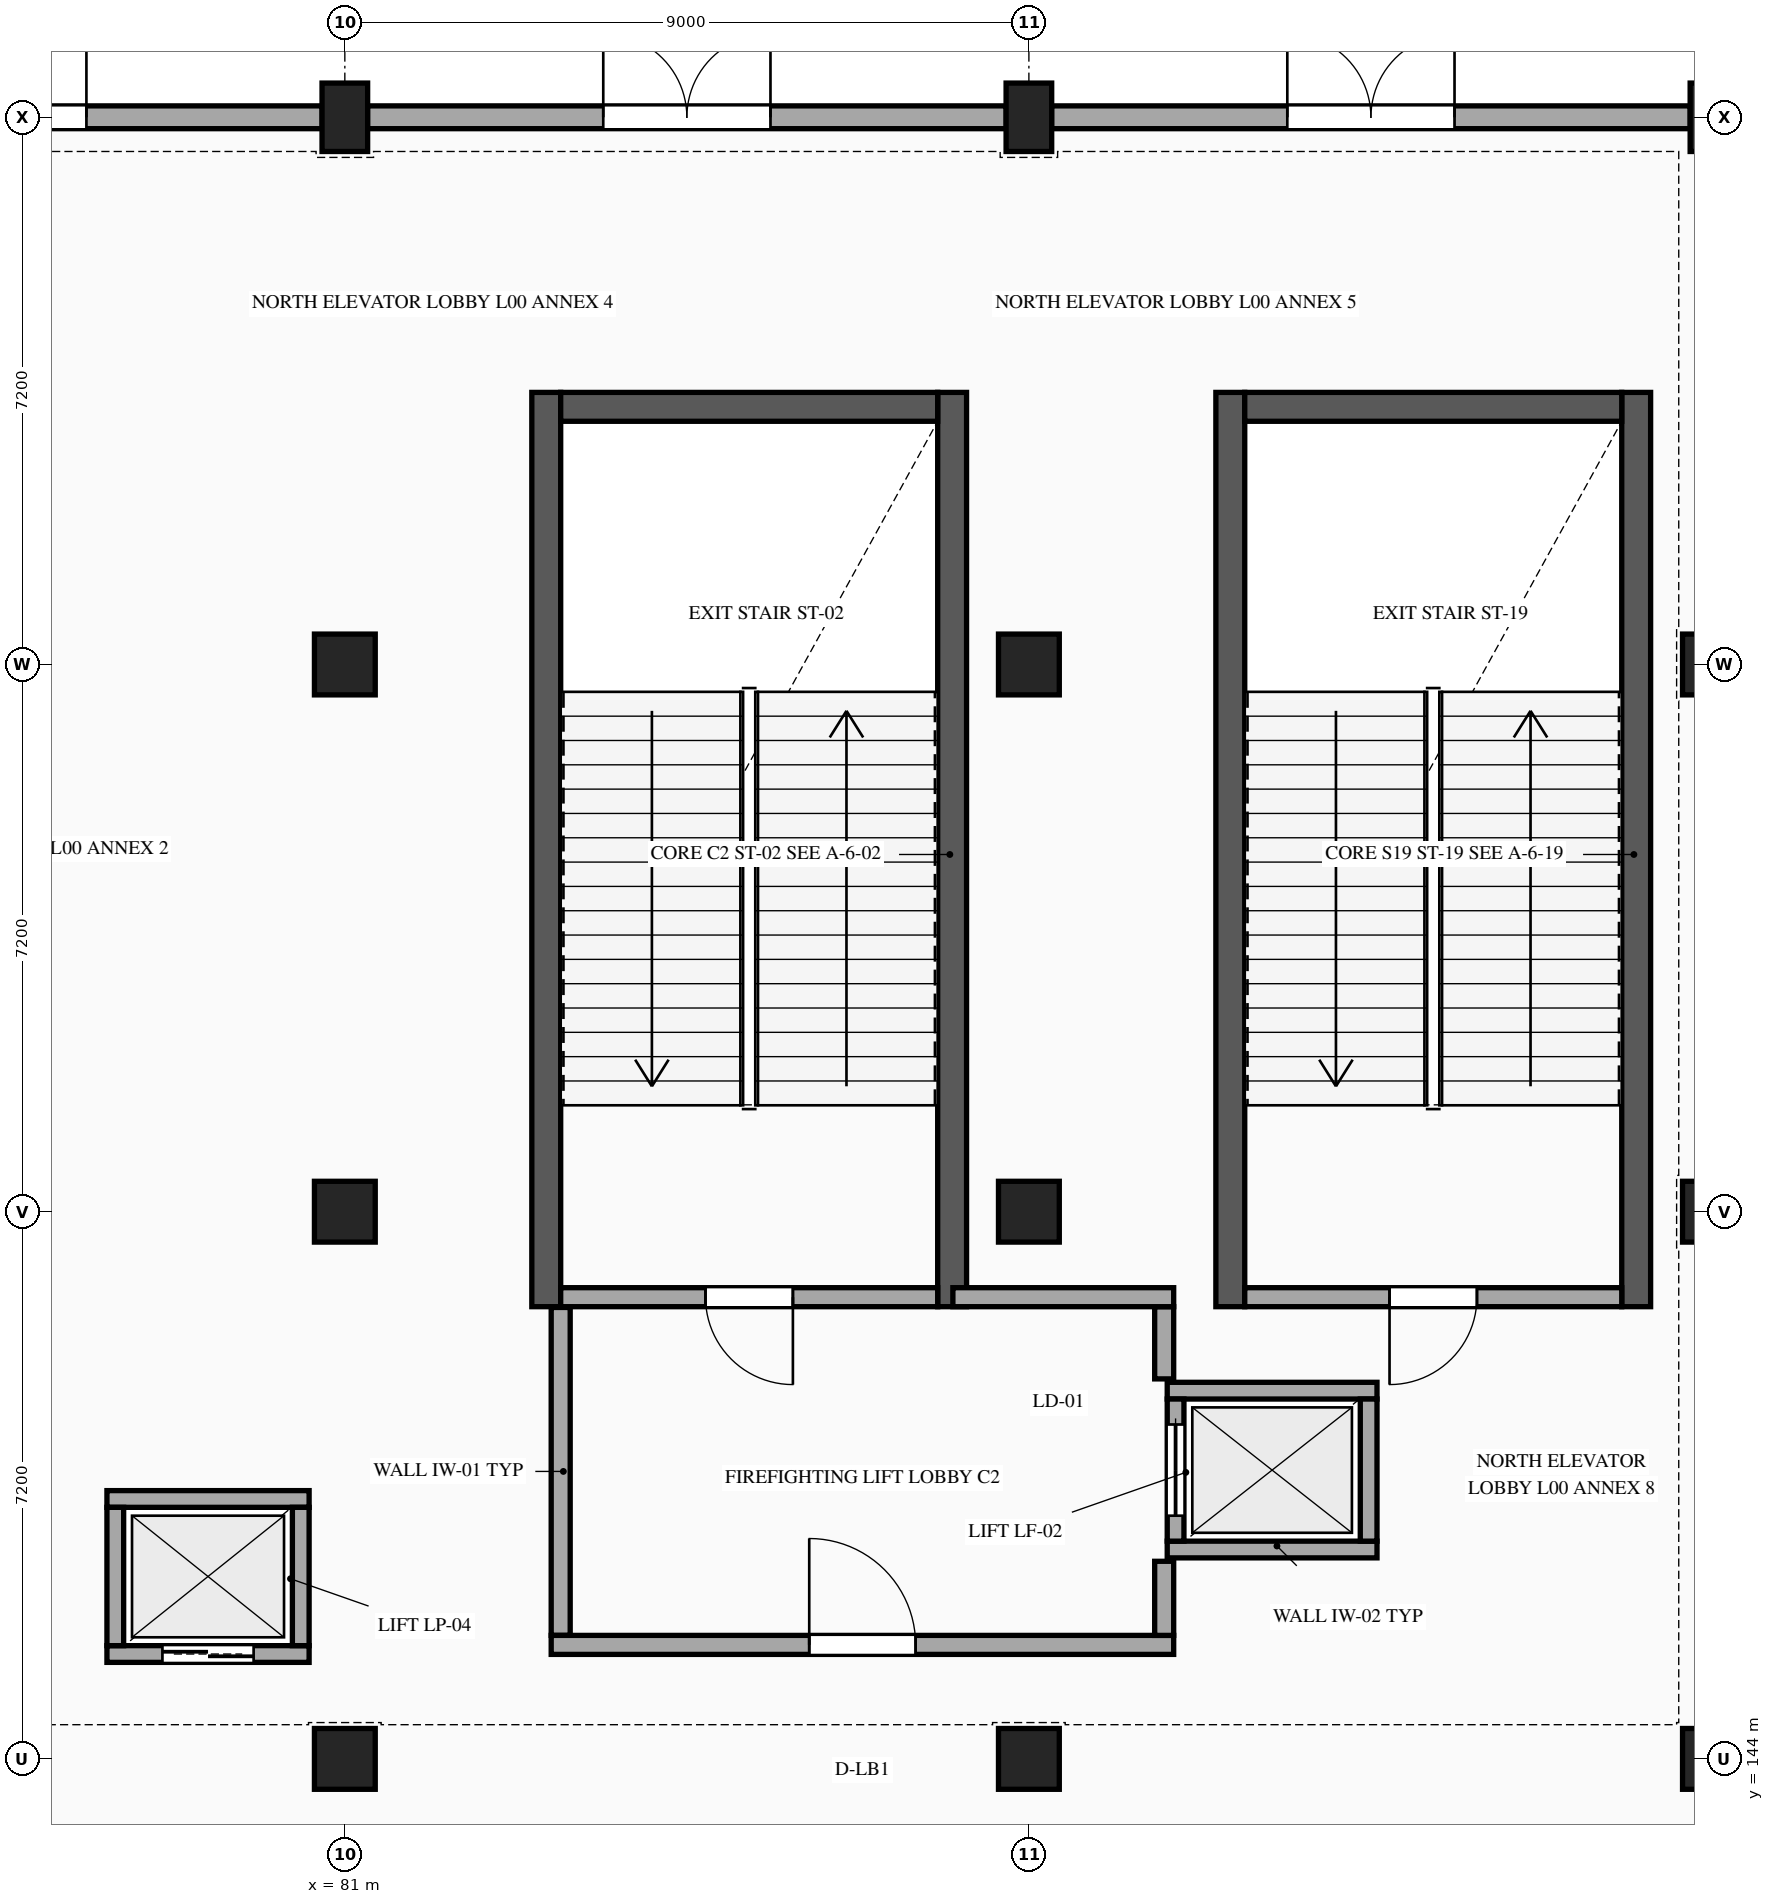
"""IFC4 building model, lengths in metres.
Left out: names, types, materials, properties, quantities, classifications, styles, units other than length and angle.
Written with IfcOpenShell. Run it as: python <this file> out.ifc"""

import sys

from ifc_helpers import new_model, si_unit, direction, frame, frame_2d, origin, origin_2d, place, context, subcontext, project, spatial, rectangle, extrude, element, fill, save


model = new_model("IFC4")
c1 = context("Model", 3, precision=1e-05, world=origin(), true_north=direction((0.0, 1.0)))
c2 = subcontext(c1, "Body", "Model", "MODEL_VIEW")
j1 = project(units=[si_unit("LENGTHUNIT", "METRE"), si_unit("PLANEANGLEUNIT", "RADIAN")], contexts=[c1])
p1 = place(None, origin())
s1 = spatial("IfcSite", under=j1, at=p1, CompositionType="ELEMENT")
p2 = place(p1, origin())
s2 = spatial("IfcBuilding", under=s1, at=p2, CompositionType="ELEMENT")
p3 = place(p2, origin())
s3 = spatial("IfcBuildingStorey", under=s2, at=p3, CompositionType="ELEMENT", Elevation=0.0)
for number, where, z_axis, x_axis in (
    (1, (81.0, 144.0, 0.0), (0.0, 0.0, 1.0), (1.0, 0.0, 0.0)),
    (2, (81.0, 151.2, 0.0), (0.0, 0.0, 1.0), (1.0, 0.0, 0.0)),
    (3, (81.0, 158.4, 0.0), (0.0, 0.0, 1.0), (1.0, 0.0, 0.0)),
):
    element("IfcColumn", number, at=place(p3, frame(where, z_axis=z_axis, x_axis=x_axis)), inside=s3, PredefinedType="COLUMN", context=c2, shape_type="SweptSolid", body=[
        extrude(rectangle(XDim=0.8, YDim=0.8, at=origin_2d()), origin(), (0.0, 0.0, 1.0), 5.4),
    ])
p4 = place(p3, frame((81.0, 165.6, 0.0), z_axis=(0.0, 0.0, 1.0), x_axis=(1.0, 0.0, 0.0)))
e4 = element("IfcColumn", 4, at=p4, inside=s3, PredefinedType="COLUMN", context=c2, shape_type="SweptSolid", body=[
    extrude(rectangle(XDim=0.6, YDim=0.9, at=origin_2d()), origin(), (0.0, 0.0, 1.0), 5.4),
])
for number, where, z_axis, x_axis in (
    (5, (90.0, 144.0, 0.0), (0.0, 0.0, 1.0), (1.0, 0.0, 0.0)),
    (6, (90.0, 151.2, 0.0), (0.0, 0.0, 1.0), (1.0, 0.0, 0.0)),
    (7, (90.0, 158.4, 0.0), (0.0, 0.0, 1.0), (1.0, 0.0, 0.0)),
):
    element("IfcColumn", number, at=place(p3, frame(where, z_axis=z_axis, x_axis=x_axis)), inside=s3, PredefinedType="COLUMN", context=c2, shape_type="SweptSolid", body=[
        extrude(rectangle(XDim=0.8, YDim=0.8, at=origin_2d()), origin(), (0.0, 0.0, 1.0), 5.4),
    ])
p5 = place(p3, frame((90.0, 165.6, 0.0), z_axis=(0.0, 0.0, 1.0), x_axis=(1.0, 0.0, 0.0)))
e8 = element("IfcColumn", 8, at=p5, inside=s3, PredefinedType="COLUMN", context=c2, shape_type="SweptSolid", body=[
    extrude(rectangle(XDim=0.6, YDim=0.9, at=origin_2d()), origin(), (0.0, 0.0, 1.0), 5.4),
])
for number, where, z_axis, x_axis in (
    (9, (99.0, 144.0, 0.0), (0.0, 0.0, 1.0), (1.0, 0.0, 0.0)),
    (10, (99.0, 151.2, 0.0), (0.0, 0.0, 1.0), (1.0, 0.0, 0.0)),
    (11, (99.0, 158.4, 0.0), (0.0, 0.0, 1.0), (1.0, 0.0, 0.0)),
):
    element("IfcColumn", number, at=place(p3, frame(where, z_axis=z_axis, x_axis=x_axis)), inside=s3, PredefinedType="COLUMN", context=c2, shape_type="SweptSolid", body=[
        extrude(rectangle(XDim=0.8, YDim=0.8, at=origin_2d()), origin(), (0.0, 0.0, 1.0), 5.4),
    ])
p6 = place(p3, frame((99.0, 165.6, 0.0), z_axis=(0.0, 0.0, 1.0), x_axis=(1.0, 0.0, 0.0)))
e12 = element("IfcColumn", 12, at=p6, inside=s3, PredefinedType="COLUMN", context=c2, shape_type="SweptSolid", body=[
    extrude(rectangle(XDim=0.6, YDim=0.9, at=origin_2d()), origin(), (0.0, 0.0, 1.0), 5.4),
])
for number, where, z_axis, x_axis in (
    (13, (83.65, 149.95, 0.0), (0.0, 0.0, 1.0), (0.0, 1.0, 0.0)),
    (14, (88.99, 161.98, 0.0), (0.0, 0.0, 1.0), (0.0, -1.0, 0.0)),
):
    element("IfcWall", number, at=place(p3, frame(where, z_axis=z_axis, x_axis=x_axis)), inside=s3, PredefinedType="SHEAR", context=c2, shape_type="SweptSolid", body=[
        extrude(rectangle(XDim=12.03, YDim=0.38, at=frame_2d((6.015, 0.0))), origin(), (0.0, 0.0, 1.0), 5.12),
    ])
p7 = place(p3, frame((83.84, 161.79, 0.0), z_axis=(0.0, 0.0, 1.0), x_axis=(1.0, 0.0, 0.0)))
e15 = element("IfcWall", 15, at=p7, inside=s3, PredefinedType="SHEAR", context=c2, shape_type="SweptSolid", body=[
    extrude(rectangle(XDim=4.96, YDim=0.38, at=frame_2d((2.48, 0.0))), origin(), (0.0, 0.0, 1.0), 5.12),
])
for number, where, z_axis, x_axis in (
    (16, (92.65, 149.95, 0.0), (0.0, 0.0, 1.0), (0.0, 1.0, 0.0)),
    (17, (97.99, 161.98, 0.0), (0.0, 0.0, 1.0), (0.0, -1.0, 0.0)),
):
    element("IfcWall", number, at=place(p3, frame(where, z_axis=z_axis, x_axis=x_axis)), inside=s3, PredefinedType="SHEAR", context=c2, shape_type="SweptSolid", body=[
        extrude(rectangle(XDim=12.03, YDim=0.38, at=frame_2d((6.015, 0.0))), origin(), (0.0, 0.0, 1.0), 5.12),
    ])
p8 = place(p3, frame((92.84, 161.79, 0.0), z_axis=(0.0, 0.0, 1.0), x_axis=(1.0, 0.0, 0.0)))
e18 = element("IfcWall", 18, at=p8, inside=s3, PredefinedType="SHEAR", context=c2, shape_type="SweptSolid", body=[
    extrude(rectangle(XDim=4.96, YDim=0.38, at=frame_2d((2.48, 0.0))), origin(), (0.0, 0.0, 1.0), 5.12),
])
p9 = place(p3, frame((72.298, 165.6, 0.0), z_axis=(0.0, 0.0, 1.0), x_axis=(1.0, 0.0, 0.0)))
e19 = element("IfcWall", 19, at=p9, inside=s3, PredefinedType="STANDARD", context=c2, shape_type="SweptSolid", body=[
    extrude(rectangle(XDim=8.404, YDim=0.3, at=frame_2d((4.202, 0.0))), origin(), (0.0, 0.0, 1.0), 4.653),
])
p10 = place(p9, frame((3.102, 0.0, 0.0)))
e20 = element("IfcOpeningElement", 20, at=p10, cuts=e19, PredefinedType="OPENING", context=c2, shape_type="SweptSolid", body=[
    extrude(rectangle(XDim=2.2, YDim=2.4, at=frame_2d((1.1, 1.2))), frame((0.0, 0.16, 0.0), z_axis=(0.0, -1.0, 0.0), x_axis=(1.0, 0.0, 0.0)), (0.0, 0.0, 1.0), 0.32),
])
p11 = place(p3, frame((81.298, 165.6, 0.0), z_axis=(0.0, 0.0, 1.0), x_axis=(1.0, 0.0, 0.0)))
e21 = element("IfcWall", 21, at=p11, inside=s3, PredefinedType="STANDARD", context=c2, shape_type="SweptSolid", body=[
    extrude(rectangle(XDim=8.404, YDim=0.3, at=frame_2d((4.202, 0.0))), origin(), (0.0, 0.0, 1.0), 4.747),
])
p12 = place(p11, frame((3.102, 0.0, 0.0)))
e22 = element("IfcOpeningElement", 22, at=p12, cuts=e21, PredefinedType="OPENING", context=c2, shape_type="SweptSolid", body=[
    extrude(rectangle(XDim=2.2, YDim=2.4, at=frame_2d((1.1, 1.2))), frame((0.0, 0.16, 0.0), z_axis=(0.0, -1.0, 0.0), x_axis=(1.0, 0.0, 0.0)), (0.0, 0.0, 1.0), 0.32),
])
p13 = place(p3, frame((90.298, 165.6, 0.0), z_axis=(0.0, 0.0, 1.0), x_axis=(1.0, 0.0, 0.0)))
e23 = element("IfcWall", 23, at=p13, inside=s3, PredefinedType="STANDARD", context=c2, shape_type="SweptSolid", body=[
    extrude(rectangle(XDim=8.404, YDim=0.3, at=frame_2d((4.202, 0.0))), origin(), (0.0, 0.0, 1.0), 4.747),
])
p14 = place(p13, frame((3.102, 0.0, 0.0)))
e24 = element("IfcOpeningElement", 24, at=p14, cuts=e23, PredefinedType="OPENING", context=c2, shape_type="SweptSolid", body=[
    extrude(rectangle(XDim=2.2, YDim=2.4, at=frame_2d((1.1, 1.2))), frame((0.0, 0.16, 0.0), z_axis=(0.0, -1.0, 0.0), x_axis=(1.0, 0.0, 0.0)), (0.0, 0.0, 1.0), 0.32),
])
p15 = place(p3, frame((88.8, 150.075, 0.0), z_axis=(0.0, 0.0, 1.0), x_axis=(-1.0, 0.0, 0.0)))
e25 = element("IfcWall", 25, at=p15, inside=s3, PredefinedType="STANDARD", context=c2, shape_type="SweptSolid", body=[
    extrude(rectangle(XDim=4.96, YDim=0.25, at=frame_2d((2.48, 0.0))), origin(), (0.0, 0.0, 1.0), 5.08),
])
p16 = place(p15, frame((1.905, 0.0, 0.0)))
e26 = element("IfcOpeningElement", 26, at=p16, cuts=e25, PredefinedType="OPENING", context=c2, shape_type="SweptSolid", body=[
    extrude(rectangle(XDim=1.15, YDim=2.2, at=frame_2d((0.575, 1.1))), frame((0.0, 0.135, 0.0), z_axis=(0.0, -1.0, 0.0), x_axis=(1.0, 0.0, 0.0)), (0.0, 0.0, 1.0), 0.27),
])
for number, where, z_axis, x_axis in (
    (27, (91.82, 146.755, 0.0), (0.0, 0.0, 1.0), (1.0, 0.0, 0.0)),
    (28, (94.58, 148.845, 0.0), (0.0, 0.0, 1.0), (-1.0, 0.0, 0.0)),
):
    element("IfcWall", number, at=place(p3, frame(where, z_axis=z_axis, x_axis=x_axis)), inside=s3, PredefinedType="STANDARD", context=c2, shape_type="SweptSolid", body=[
        extrude(rectangle(XDim=2.76, YDim=0.22, at=frame_2d((1.38, 0.0))), origin(), (0.0, 0.0, 1.0), 5.08),
    ])
p17 = place(p3, frame((91.93, 148.735, 0.0), z_axis=(0.0, 0.0, 1.0), x_axis=(0.0, -1.0, 0.0)))
e29 = element("IfcWall", 29, at=p17, inside=s3, PredefinedType="STANDARD", context=c2, shape_type="SweptSolid", body=[
    extrude(rectangle(XDim=1.87, YDim=0.22, at=frame_2d((0.935, 0.0))), origin(), (0.0, 0.0, 1.0), 5.08),
])
p18 = place(p17, frame((0.335, 0.0, 0.0)))
e30 = element("IfcOpeningElement", 30, at=p18, cuts=e29, PredefinedType="OPENING", context=c2, shape_type="SweptSolid", body=[
    extrude(rectangle(XDim=1.2, YDim=2.2, at=frame_2d((0.6, 1.1))), frame((0.0, 0.12, 0.0), z_axis=(0.0, -1.0, 0.0), x_axis=(1.0, 0.0, 0.0)), (0.0, 0.0, 1.0), 0.24),
])
p19 = place(p3, frame((94.47, 146.865, 0.0), z_axis=(0.0, 0.0, 1.0), x_axis=(0.0, 1.0, 0.0)))
e31 = element("IfcWall", 31, at=p19, inside=s3, PredefinedType="STANDARD", context=c2, shape_type="SweptSolid", body=[
    extrude(rectangle(XDim=1.87, YDim=0.22, at=frame_2d((0.935, 0.0))), origin(), (0.0, 0.0, 1.0), 5.08),
])
p20 = place(p3, frame((77.87, 145.38, 0.0), z_axis=(0.0, 0.0, 1.0), x_axis=(1.0, 0.0, 0.0)))
e32 = element("IfcWall", 32, at=p20, inside=s3, PredefinedType="STANDARD", context=c2, shape_type="SweptSolid", body=[
    extrude(rectangle(XDim=2.66, YDim=0.22, at=frame_2d((1.33, 0.0))), origin(), (0.0, 0.0, 1.0), 5.08),
])
p21 = place(p20, frame((0.73, 0.0, 0.0)))
e33 = element("IfcOpeningElement", 33, at=p21, cuts=e32, PredefinedType="OPENING", context=c2, shape_type="SweptSolid", body=[
    extrude(rectangle(XDim=1.2, YDim=2.2, at=frame_2d((0.6, 1.1))), frame((0.0, 0.12, 0.0), z_axis=(0.0, -1.0, 0.0), x_axis=(1.0, 0.0, 0.0)), (0.0, 0.0, 1.0), 0.24),
])
p22 = place(p3, frame((80.53, 147.42, 0.0), z_axis=(0.0, 0.0, 1.0), x_axis=(-1.0, 0.0, 0.0)))
e34 = element("IfcWall", 34, at=p22, inside=s3, PredefinedType="STANDARD", context=c2, shape_type="SweptSolid", body=[
    extrude(rectangle(XDim=2.66, YDim=0.22, at=frame_2d((1.33, 0.0))), origin(), (0.0, 0.0, 1.0), 5.08),
])
for number, where, z_axis, x_axis in (
    (35, (77.98, 147.31, 0.0), (0.0, 0.0, 1.0), (0.0, -1.0, 0.0)),
    (36, (80.42, 145.49, 0.0), (0.0, 0.0, 1.0), (0.0, 1.0, 0.0)),
):
    element("IfcWall", number, at=place(p3, frame(where, z_axis=z_axis, x_axis=x_axis)), inside=s3, PredefinedType="STANDARD", context=c2, shape_type="SweptSolid", body=[
        extrude(rectangle(XDim=1.82, YDim=0.22, at=frame_2d((0.91, 0.0))), origin(), (0.0, 0.0, 1.0), 5.08),
    ])
p23 = place(p3, frame((97.8, 150.075, 0.0), z_axis=(0.0, 0.0, 1.0), x_axis=(-1.0, 0.0, 0.0)))
e37 = element("IfcWall", 37, at=p23, inside=s3, PredefinedType="STANDARD", context=c2, shape_type="SweptSolid", body=[
    extrude(rectangle(XDim=4.96, YDim=0.25, at=frame_2d((2.48, 0.0))), origin(), (0.0, 0.0, 1.0), 5.08),
])
p24 = place(p23, frame((1.905, 0.0, 0.0)))
e38 = element("IfcOpeningElement", 38, at=p24, cuts=e37, PredefinedType="OPENING", context=c2, shape_type="SweptSolid", body=[
    extrude(rectangle(XDim=1.15, YDim=2.2, at=frame_2d((0.575, 1.1))), frame((0.0, 0.135, 0.0), z_axis=(0.0, -1.0, 0.0), x_axis=(1.0, 0.0, 0.0)), (0.0, 0.0, 1.0), 0.27),
])
p25 = place(p3, frame((83.84, 149.94, 0.0), z_axis=(0.0, 0.0, 1.0), x_axis=(0.0, -1.0, 0.0)))
e39 = element("IfcWall", 39, at=p25, inside=s3, PredefinedType="STANDARD", context=c2, shape_type="SweptSolid", body=[
    extrude(rectangle(XDim=4.315, YDim=0.25, at=frame_2d((2.157, 0.0))), origin(), (0.0, 0.0, 1.0), 4.437),
])
p26 = place(p3, frame((83.715, 145.5, 0.0), z_axis=(0.0, 0.0, 1.0), x_axis=(1.0, 0.0, 0.0)))
e40 = element("IfcWall", 40, at=p26, inside=s3, PredefinedType="STANDARD", context=c2, shape_type="SweptSolid", body=[
    extrude(rectangle(XDim=8.19, YDim=0.25, at=frame_2d((4.095, 0.0))), origin(), (0.0, 0.0, 1.0), 4.437),
])
p27 = place(p26, frame((3.395, 0.0, 0.0)))
e41 = element("IfcOpeningElement", 41, at=p27, cuts=e40, PredefinedType="OPENING", context=c2, shape_type="SweptSolid", body=[
    extrude(rectangle(XDim=1.4, YDim=2.2, at=frame_2d((0.7, 1.1))), frame((0.0, 0.135, 0.0), z_axis=(0.0, -1.0, 0.0), x_axis=(1.0, 0.0, 0.0)), (0.0, 0.0, 1.0), 0.27),
])
p28 = place(p3, frame((91.78, 145.625, 0.0), z_axis=(0.0, 0.0, 1.0), x_axis=(0.0, 1.0, 0.0)))
e42 = element("IfcWall", 42, at=p28, inside=s3, PredefinedType="STANDARD", context=c2, shape_type="SweptSolid", body=[
    extrude(rectangle(XDim=0.975, YDim=0.25, at=frame_2d((0.488, 0.0))), origin(), (0.0, 0.0, 1.0), 4.437),
])
p29 = place(p3, frame((91.78, 149.0, 0.0), z_axis=(0.0, 0.0, 1.0), x_axis=(0.0, 1.0, 0.0)))
e43 = element("IfcWall", 43, at=p29, inside=s3, PredefinedType="STANDARD", context=c2, shape_type="SweptSolid", body=[
    extrude(rectangle(XDim=0.95, YDim=0.25, at=frame_2d((0.475, 0.0))), origin(), (0.0, 0.0, 1.0), 4.437),
])
p30 = place(p3, frame((89.0, 150.075, 0.0), z_axis=(0.0, 0.0, 1.0), x_axis=(1.0, 0.0, 0.0)))
e44 = element("IfcWall", 44, at=p30, inside=s3, PredefinedType="STANDARD", context=c2, shape_type="SweptSolid", body=[
    extrude(rectangle(XDim=2.905, YDim=0.25, at=frame_2d((1.453, 0.0))), origin(), (0.0, 0.0, 1.0), 4.437),
])
p31 = place(p10, origin())
e45 = element("IfcDoor", 45, at=p31, inside=s3, OperationType="DOUBLE_DOOR_SINGLE_SWING", PredefinedType="DOOR", context=c2, shape_type="SweptSolid", body=[
    extrude(rectangle(XDim=2.2, YDim=2.4, at=frame_2d((1.1, 1.2))), frame((0.0, 0.025, 0.0), z_axis=(0.0, -1.0, 0.0), x_axis=(1.0, 0.0, 0.0)), (0.0, 0.0, 1.0), 0.05),
])
fill(e20, e45)
p32 = place(p12, origin())
e46 = element("IfcDoor", 46, at=p32, inside=s3, OperationType="DOUBLE_DOOR_SINGLE_SWING", PredefinedType="DOOR", context=c2, shape_type="SweptSolid", body=[
    extrude(rectangle(XDim=2.2, YDim=2.4, at=frame_2d((1.1, 1.2))), frame((0.0, 0.025, 0.0), z_axis=(0.0, -1.0, 0.0), x_axis=(1.0, 0.0, 0.0)), (0.0, 0.0, 1.0), 0.05),
])
fill(e22, e46)
p33 = place(p14, origin())
e47 = element("IfcDoor", 47, at=p33, inside=s3, OperationType="DOUBLE_DOOR_SINGLE_SWING", PredefinedType="DOOR", context=c2, shape_type="SweptSolid", body=[
    extrude(rectangle(XDim=2.2, YDim=2.4, at=frame_2d((1.1, 1.2))), frame((0.0, 0.025, 0.0), z_axis=(0.0, -1.0, 0.0), x_axis=(1.0, 0.0, 0.0)), (0.0, 0.0, 1.0), 0.05),
])
fill(e24, e47)
p34 = place(p16, origin())
e48 = element("IfcDoor", 48, at=p34, inside=s3, OperationType="SINGLE_SWING_LEFT", PredefinedType="DOOR", context=c2, shape_type="SweptSolid", body=[
    extrude(rectangle(XDim=1.15, YDim=2.2, at=frame_2d((0.575, 1.1))), frame((0.0, 0.025, 0.0), z_axis=(0.0, -1.0, 0.0), x_axis=(1.0, 0.0, 0.0)), (0.0, 0.0, 1.0), 0.05),
])
fill(e26, e48)
p35 = place(p18, origin())
e49 = element("IfcDoor", 49, at=p35, inside=s3, OperationType="DOUBLE_DOOR_SLIDING", PredefinedType="DOOR", context=c2, shape_type="SweptSolid", body=[
    extrude(rectangle(XDim=1.2, YDim=2.2, at=frame_2d((0.6, 1.1))), frame((0.0, 0.025, 0.0), z_axis=(0.0, -1.0, 0.0), x_axis=(1.0, 0.0, 0.0)), (0.0, 0.0, 1.0), 0.05),
])
fill(e30, e49)
p36 = place(p21, origin())
e50 = element("IfcDoor", 50, at=p36, inside=s3, OperationType="DOUBLE_DOOR_SLIDING", PredefinedType="DOOR", context=c2, shape_type="SweptSolid", body=[
    extrude(rectangle(XDim=1.2, YDim=2.2, at=frame_2d((0.6, 1.1))), frame((0.0, 0.025, 0.0), z_axis=(0.0, -1.0, 0.0), x_axis=(1.0, 0.0, 0.0)), (0.0, 0.0, 1.0), 0.05),
])
fill(e33, e50)
p37 = place(p24, origin())
e51 = element("IfcDoor", 51, at=p37, inside=s3, OperationType="SINGLE_SWING_RIGHT", PredefinedType="DOOR", context=c2, shape_type="SweptSolid", body=[
    extrude(rectangle(XDim=1.15, YDim=2.2, at=frame_2d((0.575, 1.1))), frame((0.0, 0.025, 0.0), z_axis=(0.0, -1.0, 0.0), x_axis=(1.0, 0.0, 0.0)), (0.0, 0.0, 1.0), 0.05),
])
fill(e38, e51)
p38 = place(p27, origin())
e52 = element("IfcDoor", 52, at=p38, inside=s3, OperationType="SINGLE_SWING_LEFT", PredefinedType="DOOR", context=c2, shape_type="SweptSolid", body=[
    extrude(rectangle(XDim=1.4, YDim=2.2, at=frame_2d((0.7, 1.1))), frame((0.0, 0.025, 0.0), z_axis=(0.0, -1.0, 0.0), x_axis=(1.0, 0.0, 0.0)), (0.0, 0.0, 1.0), 0.05),
])
fill(e41, e52)
save(model, sys.argv[1])
